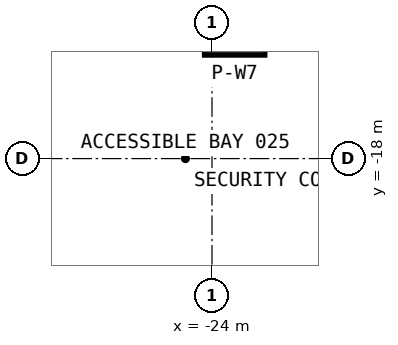
"""IFC4 building model, lengths in metres.
Left out: names, types, materials, properties, quantities, classifications, styles, units other than length and angle.
Written with IfcOpenShell. Run it as: python <this file> out.ifc"""

import sys

from ifc_helpers import new_model, si_unit, direction, frame, origin, origin_2d, place, context, subcontext, project, spatial, rectangle, extrude, element, save


model = new_model("IFC4")
c1 = context("Model", 3, precision=1e-05, world=origin(), true_north=direction((0.0, 1.0)))
c2 = subcontext(c1, "Body", "Model", "MODEL_VIEW")
j1 = project(units=[si_unit("LENGTHUNIT", "METRE"), si_unit("PLANEANGLEUNIT", "RADIAN")], contexts=[c1])
p1 = place(None, origin())
s1 = spatial("IfcSite", under=j1, at=p1, CompositionType="ELEMENT")
p2 = place(p1, origin())
s2 = spatial("IfcBuilding", under=s1, at=p2, CompositionType="ELEMENT")
p3 = place(p2, frame((0.0, 0.0, -5.5)))
s3 = spatial("IfcBuildingStorey", under=s2, at=p3, CompositionType="ELEMENT", Elevation=-5.5)
p4 = place(p3, frame((-23.403, -14.783, 0.0), z_axis=(0.0, 0.0, 1.0), x_axis=(-1.0, 0.0, 0.0)))
e1 = element("IfcColumn", 1, at=p4, inside=s3, PredefinedType="COLUMN", context=c2, shape_type="SweptSolid", body=[
    extrude(rectangle(XDim=1.6, YDim=1.0, at=origin_2d()), origin(), (0.0, 0.0, 1.0), 5.5),
])
save(model, sys.argv[1])
